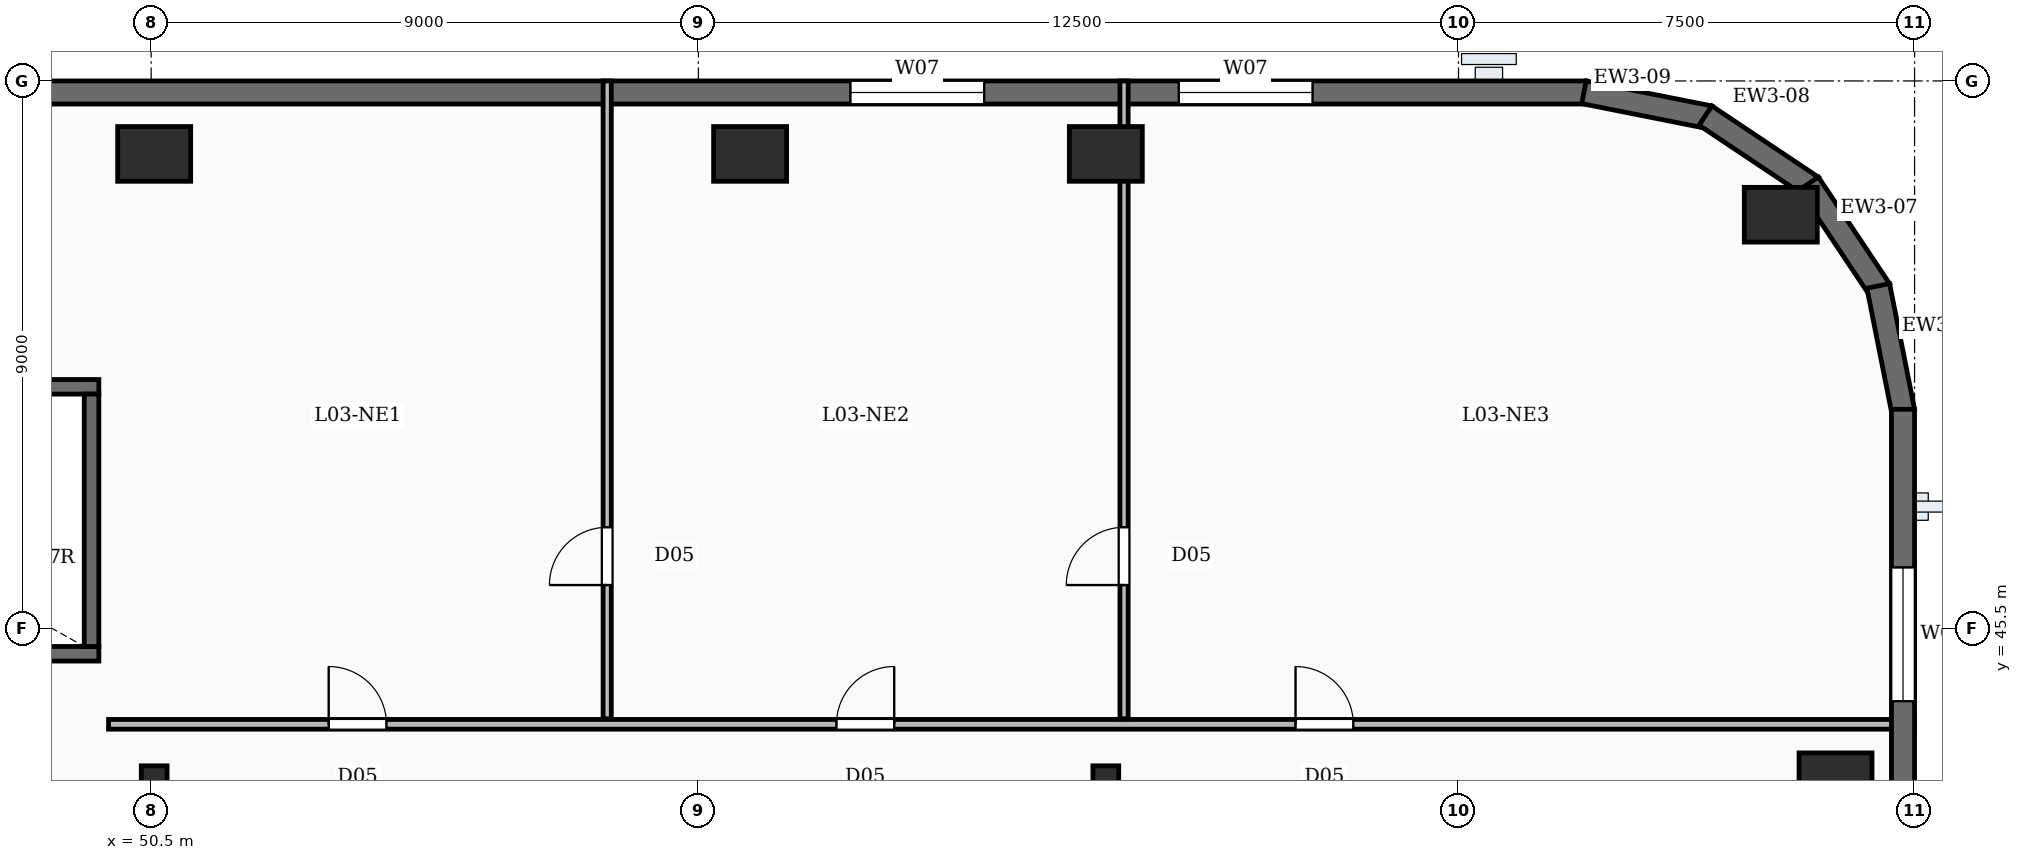
"""IFC4 building model, lengths in metres.
Left out: names, types, materials, properties, quantities, classifications, styles, units other than length and angle.
Written with IfcOpenShell. Run it as: python <this file> out.ifc"""

import sys

from ifc_helpers import new_model, si_unit, direction, frame, frame_2d, origin, origin_2d, place, context, subcontext, project, spatial, rectangle, i_section, extrude, element, fill, save


model = new_model("IFC4")
c1 = context("Model", 3, precision=1e-05, world=origin(), true_north=direction((0.0, 1.0)))
c2 = subcontext(c1, "Body", "Model", "MODEL_VIEW")
j1 = project(units=[si_unit("LENGTHUNIT", "METRE"), si_unit("PLANEANGLEUNIT", "RADIAN")], contexts=[c1])
p1 = place(None, origin())
s1 = spatial("IfcSite", under=j1, at=p1, CompositionType="ELEMENT")
p2 = place(p1, origin())
s2 = spatial("IfcBuilding", under=s1, at=p2, CompositionType="ELEMENT")
p3 = place(p2, frame((0.0, 0.0, 18.0)))
s3 = spatial("IfcBuildingStorey", under=s2, at=p3, CompositionType="ELEMENT", Elevation=18.0)
for number, where, z_axis, x_axis in (
    (1, (78.2, 43.0, -0.35), (0.0, 0.0, 1.0), (1.0, 0.0, 0.0)),
    (2, (77.3, 52.3, -0.35), (0.0, 0.0, 1.0), (1.0, 0.0, 0.0)),
    (3, (66.2, 53.3, -0.35), (0.0, 0.0, 1.0), (1.0, 0.0, 0.0)),
    (4, (60.35, 53.3, -0.35), (0.0, 0.0, 1.0), (1.0, 0.0, 0.0)),
    (5, (50.55, 53.3, -0.35), (0.0, 0.0, 1.0), (1.0, 0.0, 0.0)),
):
    element("IfcColumn", number, at=place(p3, frame(where, z_axis=z_axis, x_axis=x_axis)), inside=s3, PredefinedType="COLUMN", context=c2, shape_type="SweptSolid", body=[
        extrude(rectangle(XDim=1.2, YDim=0.9, at=origin_2d()), origin(), (0.0, 0.0, 1.0), 5.0),
    ])
for number, where, z_axis, x_axis in (
    (6, (50.55, 43.0, -0.35), (0.0, 0.0, 1.0), (1.0, 0.0, 0.0)),
    (7, (66.2, 43.0, -0.35), (0.0, 0.0, 1.0), (1.0, 0.0, 0.0)),
):
    element("IfcColumn", number, at=place(p3, frame(where, z_axis=z_axis, x_axis=x_axis)), inside=s3, PredefinedType="COLUMN", context=c2, shape_type="SweptSolid", body=[
        extrude(i_section(OverallWidth=0.424, OverallDepth=0.474, WebThickness=0.048, FlangeThickness=0.077, FilletRadius=0.02, at=origin_2d()), origin(), (0.0, 0.0, 1.0), 5.0),
    ])
p4 = place(p3, frame((79.31, 49.1, 0.0), z_axis=(0.0, 0.0, 1.0), x_axis=(0.0, -1.0, 0.0)))
e8 = element("IfcWall", 8, at=p4, inside=s3, PredefinedType="SOLIDWALL", context=c2, shape_type="SweptSolid", body=[
    extrude(rectangle(XDim=43.7, YDim=0.38, at=frame_2d((21.85, 0.0))), origin(), (0.0, 0.0, 1.0), 4.65),
])
p5 = place(p4, frame((2.6, 0.0, 0.95)))
e9 = element("IfcOpeningElement", 9, at=p5, cuts=e8, PredefinedType="OPENING", context=c2, shape_type="SweptSolid", body=[
    extrude(rectangle(XDim=2.2, YDim=2.5, at=frame_2d((1.1, 1.25))), frame((0.0, 0.2, 0.0), z_axis=(0.0, -1.0, 0.0), x_axis=(1.0, 0.0, 0.0)), (0.0, 0.0, 1.0), 0.4),
])
p6 = place(p4, frame((8.0, 0.0, 0.95)))
e10 = element("IfcOpeningElement", 10, at=p6, cuts=e8, PredefinedType="OPENING", context=c2, shape_type="SweptSolid", body=[
    extrude(rectangle(XDim=2.2, YDim=2.5, at=frame_2d((1.1, 1.25))), frame((0.0, 0.2, 0.0), z_axis=(0.0, -1.0, 0.0), x_axis=(1.0, 0.0, 0.0)), (0.0, 0.0, 1.0), 0.4),
])
p7 = place(p4, frame((29.6, 0.0, 0.95)))
e11 = element("IfcOpeningElement", 11, at=p7, cuts=e8, PredefinedType="OPENING", context=c2, shape_type="SweptSolid", body=[
    extrude(rectangle(XDim=2.2, YDim=2.5, at=frame_2d((1.1, 1.25))), frame((0.0, 0.2, 0.0), z_axis=(0.0, -1.0, 0.0), x_axis=(1.0, 0.0, 0.0)), (0.0, 0.0, 1.0), 0.4),
])
for number, where, z_axis, x_axis in (
    (12, (78.903, 51.129, 0.0), (0.0, 0.0, 1.0), (0.195, -0.981, 0.0)),
    (13, (77.76, 52.813, 0.0), (0.0, 0.0, 1.0), (0.556, -0.832, 0.0)),
    (14, (76.061, 53.931, 0.0), (0.0, 0.0, 1.0), (0.832, -0.556, 0.0)),
    (15, (74.063, 54.314, 0.0), (0.0, 0.0, 1.0), (0.981, -0.195, 0.0)),
):
    element("IfcWall", number, at=place(p3, frame(where, z_axis=z_axis, x_axis=x_axis)), inside=s3, PredefinedType="SOLIDWALL", context=c2, shape_type="SweptSolid", body=[
        extrude(rectangle(XDim=2.107, YDim=0.38, at=frame_2d((1.053, 0.0))), origin(), (0.0, 0.0, 1.0), 4.65),
    ])
p8 = place(p3, frame((5.4, 54.31, 0.0), z_axis=(0.0, 0.0, 1.0), x_axis=(1.0, 0.0, 0.0)))
e16 = element("IfcWall", 16, at=p8, inside=s3, PredefinedType="SOLIDWALL", context=c2, shape_type="SweptSolid", body=[
    extrude(rectangle(XDim=68.7, YDim=0.38, at=frame_2d((34.35, 0.0))), origin(), (0.0, 0.0, 1.0), 4.65),
])
p9 = place(p8, frame((13.4, 0.0, 0.95)))
e17 = element("IfcOpeningElement", 17, at=p9, cuts=e16, PredefinedType="OPENING", context=c2, shape_type="SweptSolid", body=[
    extrude(rectangle(XDim=2.2, YDim=2.5, at=frame_2d((1.1, 1.25))), frame((0.0, 0.2, 0.0), z_axis=(0.0, -1.0, 0.0), x_axis=(1.0, 0.0, 0.0)), (0.0, 0.0, 1.0), 0.4),
])
p10 = place(p8, frame((24.2, 0.0, 0.95)))
e18 = element("IfcOpeningElement", 18, at=p10, cuts=e16, PredefinedType="OPENING", context=c2, shape_type="SweptSolid", body=[
    extrude(rectangle(XDim=2.2, YDim=2.5, at=frame_2d((1.1, 1.25))), frame((0.0, 0.2, 0.0), z_axis=(0.0, -1.0, 0.0), x_axis=(1.0, 0.0, 0.0)), (0.0, 0.0, 1.0), 0.4),
])
p11 = place(p8, frame((35.0, 0.0, 0.95)))
e19 = element("IfcOpeningElement", 19, at=p11, cuts=e16, PredefinedType="OPENING", context=c2, shape_type="SweptSolid", body=[
    extrude(rectangle(XDim=2.2, YDim=2.5, at=frame_2d((1.1, 1.25))), frame((0.0, 0.2, 0.0), z_axis=(0.0, -1.0, 0.0), x_axis=(1.0, 0.0, 0.0)), (0.0, 0.0, 1.0), 0.4),
])
p12 = place(p8, frame((40.4, 0.0, 0.95)))
e20 = element("IfcOpeningElement", 20, at=p12, cuts=e16, PredefinedType="OPENING", context=c2, shape_type="SweptSolid", body=[
    extrude(rectangle(XDim=2.2, YDim=2.5, at=frame_2d((1.1, 1.25))), frame((0.0, 0.2, 0.0), z_axis=(0.0, -1.0, 0.0), x_axis=(1.0, 0.0, 0.0)), (0.0, 0.0, 1.0), 0.4),
])
p13 = place(p8, frame((56.6, 0.0, 0.95)))
e21 = element("IfcOpeningElement", 21, at=p13, cuts=e16, PredefinedType="OPENING", context=c2, shape_type="SweptSolid", body=[
    extrude(rectangle(XDim=2.2, YDim=2.5, at=frame_2d((1.1, 1.25))), frame((0.0, 0.2, 0.0), z_axis=(0.0, -1.0, 0.0), x_axis=(1.0, 0.0, 0.0)), (0.0, 0.0, 1.0), 0.4),
])
p14 = place(p8, frame((62.0, 0.0, 0.95)))
e22 = element("IfcOpeningElement", 22, at=p14, cuts=e16, PredefinedType="OPENING", context=c2, shape_type="SweptSolid", body=[
    extrude(rectangle(XDim=2.2, YDim=2.5, at=frame_2d((1.1, 1.25))), frame((0.0, 0.2, 0.0), z_axis=(0.0, -1.0, 0.0), x_axis=(1.0, 0.0, 0.0)), (0.0, 0.0, 1.0), 0.4),
])
p15 = place(p3, frame((49.64, 45.08, 0.0), z_axis=(0.0, 0.0, 1.0), x_axis=(-1.0, 0.0, 0.0)))
e23 = element("IfcWall", 23, at=p15, inside=s3, PredefinedType="SOLIDWALL", context=c2, shape_type="SweptSolid", body=[
    extrude(rectangle(XDim=9.88, YDim=0.24, at=frame_2d((4.94, 0.0))), origin(), (0.0, 0.0, 1.0), 4.65),
])
p16 = place(p15, frame((8.09, 0.0, 0.0)))
e24 = element("IfcOpeningElement", 24, at=p16, cuts=e23, PredefinedType="OPENING", context=c2, shape_type="SweptSolid", body=[
    extrude(rectangle(XDim=1.1, YDim=2.15, at=frame_2d((0.55, 1.075))), frame((0.0, 0.13, 0.0), z_axis=(0.0, -1.0, 0.0), x_axis=(1.0, 0.0, 0.0)), (0.0, 0.0, 1.0), 0.26),
])
p17 = place(p3, frame((39.76, 49.47, 0.0), z_axis=(0.0, 0.0, 1.0), x_axis=(1.0, 0.0, 0.0)))
e25 = element("IfcWall", 25, at=p17, inside=s3, PredefinedType="SOLIDWALL", context=c2, shape_type="SweptSolid", body=[
    extrude(rectangle(XDim=9.88, YDim=0.24, at=frame_2d((4.94, 0.0))), origin(), (0.0, 0.0, 1.0), 4.65),
])
p18 = place(p3, frame((49.52, 45.2, 0.0), z_axis=(0.0, 0.0, 1.0), x_axis=(0.0, 1.0, 0.0)))
e26 = element("IfcWall", 26, at=p18, inside=s3, PredefinedType="SOLIDWALL", context=c2, shape_type="SweptSolid", body=[
    extrude(rectangle(XDim=4.15, YDim=0.24, at=frame_2d((2.075, 0.0))), origin(), (0.0, 0.0, 1.0), 4.65),
])
p19 = place(p3, frame((58.0, 44.01, 0.0), z_axis=(0.0, 0.0, 1.0), x_axis=(0.0, 1.0, 0.0)))
e27 = element("IfcWall", 27, at=p19, inside=s3, PredefinedType="PARTITIONING", context=c2, shape_type="SweptSolid", body=[
    extrude(rectangle(XDim=10.49, YDim=0.135, at=frame_2d((5.245, 0.0))), origin(), (0.0, 0.0, 1.0), 3.71),
])
p20 = place(p19, frame((2.2, 0.0, 0.0)))
e28 = element("IfcOpeningElement", 28, at=p20, cuts=e27, PredefinedType="OPENING", context=c2, shape_type="SweptSolid", body=[
    extrude(rectangle(XDim=0.95, YDim=2.15, at=frame_2d((0.475, 1.075))), frame((0.0, 0.077, 0.0), z_axis=(0.0, -1.0, 0.0), x_axis=(1.0, 0.0, 0.0)), (0.0, 0.0, 1.0), 0.155),
])
p21 = place(p3, frame((66.5, 44.01, 0.0), z_axis=(0.0, 0.0, 1.0), x_axis=(0.0, 1.0, 0.0)))
e29 = element("IfcWall", 29, at=p21, inside=s3, PredefinedType="PARTITIONING", context=c2, shape_type="SweptSolid", body=[
    extrude(rectangle(XDim=10.49, YDim=0.135, at=frame_2d((5.245, 0.0))), origin(), (0.0, 0.0, 1.0), 3.71),
])
p22 = place(p21, frame((2.2, 0.0, 0.0)))
e30 = element("IfcOpeningElement", 30, at=p22, cuts=e29, PredefinedType="OPENING", context=c2, shape_type="SweptSolid", body=[
    extrude(rectangle(XDim=0.95, YDim=2.15, at=frame_2d((0.475, 1.075))), frame((0.0, 0.077, 0.0), z_axis=(0.0, -1.0, 0.0), x_axis=(1.0, 0.0, 0.0)), (0.0, 0.0, 1.0), 0.155),
])
p23 = place(p3, frame((49.8, 43.92, 0.0), z_axis=(0.0, 0.0, 1.0), x_axis=(1.0, 0.0, 0.0)))
e31 = element("IfcWall", 31, at=p23, inside=s3, PredefinedType="PARTITIONING", context=c2, shape_type="SweptSolid", body=[
    extrude(rectangle(XDim=29.7, YDim=0.16, at=frame_2d((14.85, 0.0))), origin(), (0.0, 0.0, 1.0), 3.71),
])
p24 = place(p23, frame((3.62, 0.0, 0.0)))
e32 = element("IfcOpeningElement", 32, at=p24, cuts=e31, PredefinedType="OPENING", context=c2, shape_type="SweptSolid", body=[
    extrude(rectangle(XDim=0.95, YDim=2.15, at=frame_2d((0.475, 1.075))), frame((0.0, 0.09, 0.0), z_axis=(0.0, -1.0, 0.0), x_axis=(1.0, 0.0, 0.0)), (0.0, 0.0, 1.0), 0.18),
])
p25 = place(p23, frame((11.97, 0.0, 0.0)))
e33 = element("IfcOpeningElement", 33, at=p25, cuts=e31, PredefinedType="OPENING", context=c2, shape_type="SweptSolid", body=[
    extrude(rectangle(XDim=0.95, YDim=2.15, at=frame_2d((0.475, 1.075))), frame((0.0, 0.09, 0.0), z_axis=(0.0, -1.0, 0.0), x_axis=(1.0, 0.0, 0.0)), (0.0, 0.0, 1.0), 0.18),
])
p26 = place(p23, frame((19.52, 0.0, 0.0)))
e34 = element("IfcOpeningElement", 34, at=p26, cuts=e31, PredefinedType="OPENING", context=c2, shape_type="SweptSolid", body=[
    extrude(rectangle(XDim=0.95, YDim=2.15, at=frame_2d((0.475, 1.075))), frame((0.0, 0.09, 0.0), z_axis=(0.0, -1.0, 0.0), x_axis=(1.0, 0.0, 0.0)), (0.0, 0.0, 1.0), 0.18),
])
p27 = place(p5, origin())
e35 = element("IfcWindow", 35, at=p27, inside=s3, PartitioningType="DOUBLE_PANEL_VERTICAL", PredefinedType="WINDOW", context=c2, shape_type="SweptSolid", body=[
    extrude(rectangle(XDim=2.2, YDim=2.5, at=frame_2d((1.1, 1.25))), frame((0.0, 0.03, 0.0), z_axis=(0.0, -1.0, 0.0), x_axis=(1.0, 0.0, 0.0)), (0.0, 0.0, 1.0), 0.06),
])
fill(e9, e35)
p28 = place(p13, origin())
e36 = element("IfcWindow", 36, at=p28, inside=s3, PartitioningType="DOUBLE_PANEL_VERTICAL", PredefinedType="WINDOW", context=c2, shape_type="SweptSolid", body=[
    extrude(rectangle(XDim=2.2, YDim=2.5, at=frame_2d((1.1, 1.25))), frame((0.0, 0.03, 0.0), z_axis=(0.0, -1.0, 0.0), x_axis=(1.0, 0.0, 0.0)), (0.0, 0.0, 1.0), 0.06),
])
fill(e21, e36)
p29 = place(p14, origin())
e37 = element("IfcWindow", 37, at=p29, inside=s3, PartitioningType="DOUBLE_PANEL_VERTICAL", PredefinedType="WINDOW", context=c2, shape_type="SweptSolid", body=[
    extrude(rectangle(XDim=2.2, YDim=2.5, at=frame_2d((1.1, 1.25))), frame((0.0, 0.03, 0.0), z_axis=(0.0, -1.0, 0.0), x_axis=(1.0, 0.0, 0.0)), (0.0, 0.0, 1.0), 0.06),
])
fill(e22, e37)
p30 = place(p20, origin())
e38 = element("IfcDoor", 38, at=p30, inside=s3, OperationType="SINGLE_SWING_LEFT", PredefinedType="DOOR", context=c2, shape_type="SweptSolid", body=[
    extrude(rectangle(XDim=0.95, YDim=2.15, at=frame_2d((0.475, 1.075))), frame((0.0, 0.025, 0.0), z_axis=(0.0, -1.0, 0.0), x_axis=(1.0, 0.0, 0.0)), (0.0, 0.0, 1.0), 0.05),
])
fill(e28, e38)
p31 = place(p22, origin())
e39 = element("IfcDoor", 39, at=p31, inside=s3, OperationType="SINGLE_SWING_LEFT", PredefinedType="DOOR", context=c2, shape_type="SweptSolid", body=[
    extrude(rectangle(XDim=0.95, YDim=2.15, at=frame_2d((0.475, 1.075))), frame((0.0, 0.025, 0.0), z_axis=(0.0, -1.0, 0.0), x_axis=(1.0, 0.0, 0.0)), (0.0, 0.0, 1.0), 0.05),
])
fill(e30, e39)
p32 = place(p24, origin())
e40 = element("IfcDoor", 40, at=p32, inside=s3, OperationType="SINGLE_SWING_LEFT", PredefinedType="DOOR", context=c2, shape_type="SweptSolid", body=[
    extrude(rectangle(XDim=0.95, YDim=2.15, at=frame_2d((0.475, 1.075))), frame((0.0, 0.025, 0.0), z_axis=(0.0, -1.0, 0.0), x_axis=(1.0, 0.0, 0.0)), (0.0, 0.0, 1.0), 0.05),
])
fill(e32, e40)
p33 = place(p25, origin())
e41 = element("IfcDoor", 41, at=p33, inside=s3, OperationType="SINGLE_SWING_RIGHT", PredefinedType="DOOR", context=c2, shape_type="SweptSolid", body=[
    extrude(rectangle(XDim=0.95, YDim=2.15, at=frame_2d((0.475, 1.075))), frame((0.0, 0.025, 0.0), z_axis=(0.0, -1.0, 0.0), x_axis=(1.0, 0.0, 0.0)), (0.0, 0.0, 1.0), 0.05),
])
fill(e33, e41)
p34 = place(p26, origin())
e42 = element("IfcDoor", 42, at=p34, inside=s3, OperationType="SINGLE_SWING_LEFT", PredefinedType="DOOR", context=c2, shape_type="SweptSolid", body=[
    extrude(rectangle(XDim=0.95, YDim=2.15, at=frame_2d((0.475, 1.075))), frame((0.0, 0.025, 0.0), z_axis=(0.0, -1.0, 0.0), x_axis=(1.0, 0.0, 0.0)), (0.0, 0.0, 1.0), 0.05),
])
fill(e34, e42)
save(model, sys.argv[1])
